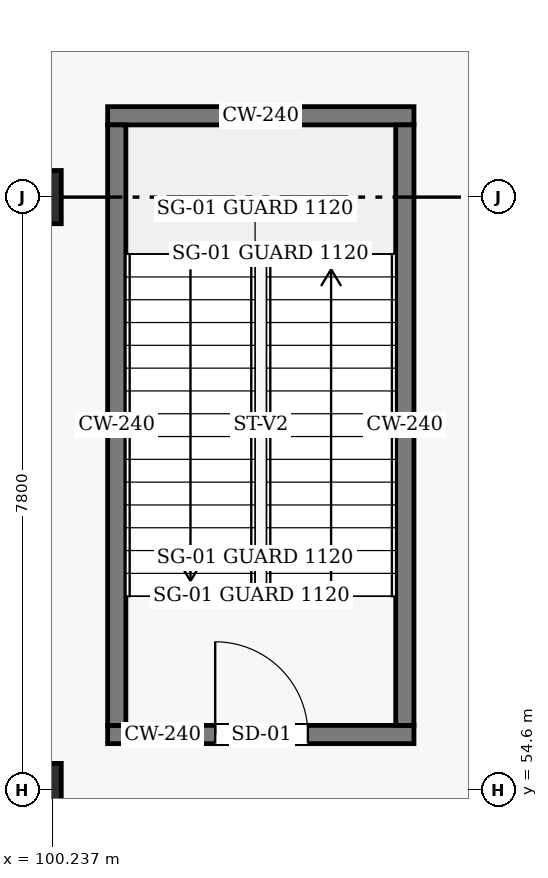
"""IFC4 building model, lengths in metres.
Left out: names, types, materials, properties, quantities, classifications, styles, units other than length and angle.
Written with IfcOpenShell. Run it as: python <this file> out.ifc"""

import sys

from ifc_helpers import new_model, si_unit, direction, frame, frame_2d, origin, origin_2d, place, context, subcontext, project, spatial, rectangle, extrude, element, fill, save


model = new_model("IFC4")
c1 = context("Model", 3, precision=1e-05, world=origin(), true_north=direction((0.0, 1.0)))
c2 = subcontext(c1, "Body", "Model", "MODEL_VIEW")
j1 = project(units=[si_unit("LENGTHUNIT", "METRE"), si_unit("PLANEANGLEUNIT", "RADIAN")], contexts=[c1])
p1 = place(None, origin())
s1 = spatial("IfcSite", under=j1, at=p1, CompositionType="ELEMENT")
p2 = place(p1, origin())
s2 = spatial("IfcBuilding", under=s1, at=p2, CompositionType="ELEMENT")
p3 = place(p2, frame((0.0, 0.0, -4.8)))
s3 = spatial("IfcBuildingStorey", under=s2, at=p3, CompositionType="ELEMENT", Elevation=-4.8)
for number, where, z_axis, x_axis in (
    (1, (100.0, 54.6, 0.0), (0.0, 0.0, 1.0), (1.0, 0.0, 0.0)),
    (2, (100.0, 62.4, 0.0), (0.0, 0.0, 1.0), (1.0, 0.0, 0.0)),
):
    element("IfcColumn", number, at=place(p3, frame(where, z_axis=z_axis, x_axis=x_axis)), inside=s3, PredefinedType="COLUMN", context=c2, shape_type="SweptSolid", body=[
        extrude(rectangle(XDim=0.7, YDim=0.7, at=origin_2d()), origin(), (0.0, 0.0, 1.0), 4.8),
    ])
p4 = place(p3, frame((100.96, 55.33, 0.0), z_axis=(0.0, 0.0, 1.0), x_axis=(1.0, 0.0, 0.0)))
e3 = element("IfcWall", 3, at=p4, inside=s3, PredefinedType="SHEAR", context=c2, shape_type="SweptSolid", body=[
    extrude(rectangle(XDim=4.03, YDim=0.24, at=frame_2d((2.015, 0.0))), origin(), (0.0, 0.0, 1.0), 4.54),
])
p5 = place(p4, frame((1.415, 0.0, 0.0)))
e4 = element("IfcOpeningElement", 4, at=p5, cuts=e3, PredefinedType="OPENING", context=c2, shape_type="SweptSolid", body=[
    extrude(rectangle(XDim=1.22, YDim=2.18, at=frame_2d((0.61, 1.09))), frame((0.0, 0.13, 0.0), z_axis=(0.0, -1.0, 0.0), x_axis=(1.0, 0.0, 0.0)), (0.0, 0.0, 1.0), 0.26),
])
p6 = place(p3, frame((100.96, 63.47, 0.0), z_axis=(0.0, 0.0, 1.0), x_axis=(1.0, 0.0, 0.0)))
e5 = element("IfcWall", 5, at=p6, inside=s3, PredefinedType="SHEAR", context=c2, shape_type="SweptSolid", body=[
    extrude(rectangle(XDim=4.03, YDim=0.24, at=frame_2d((2.015, 0.0))), origin(), (0.0, 0.0, 1.0), 4.54),
])
for number, where, z_axis, x_axis in (
    (6, (101.08, 55.45, 0.0), (0.0, 0.0, 1.0), (0.0, 1.0, 0.0)),
    (7, (104.87, 55.45, 0.0), (0.0, 0.0, 1.0), (0.0, 1.0, 0.0)),
):
    element("IfcWall", number, at=place(p3, frame(where, z_axis=z_axis, x_axis=x_axis)), inside=s3, PredefinedType="SHEAR", context=c2, shape_type="SweptSolid", body=[
        extrude(rectangle(XDim=7.9, YDim=0.24, at=frame_2d((3.95, 0.0))), origin(), (0.0, 0.0, 1.0), 4.54),
    ])
p7 = place(p5, origin())
e8 = element("IfcDoor", 8, at=p7, inside=s3, OperationType="SINGLE_SWING_LEFT", PredefinedType="DOOR", context=c2, shape_type="SweptSolid", body=[
    extrude(rectangle(XDim=1.22, YDim=2.18, at=frame_2d((0.61, 1.09))), frame((0.0, 0.025, 0.0), z_axis=(0.0, -1.0, 0.0), x_axis=(1.0, 0.0, 0.0)), (0.0, 0.0, 1.0), 0.05),
])
fill(e4, e8)
save(model, sys.argv[1])
